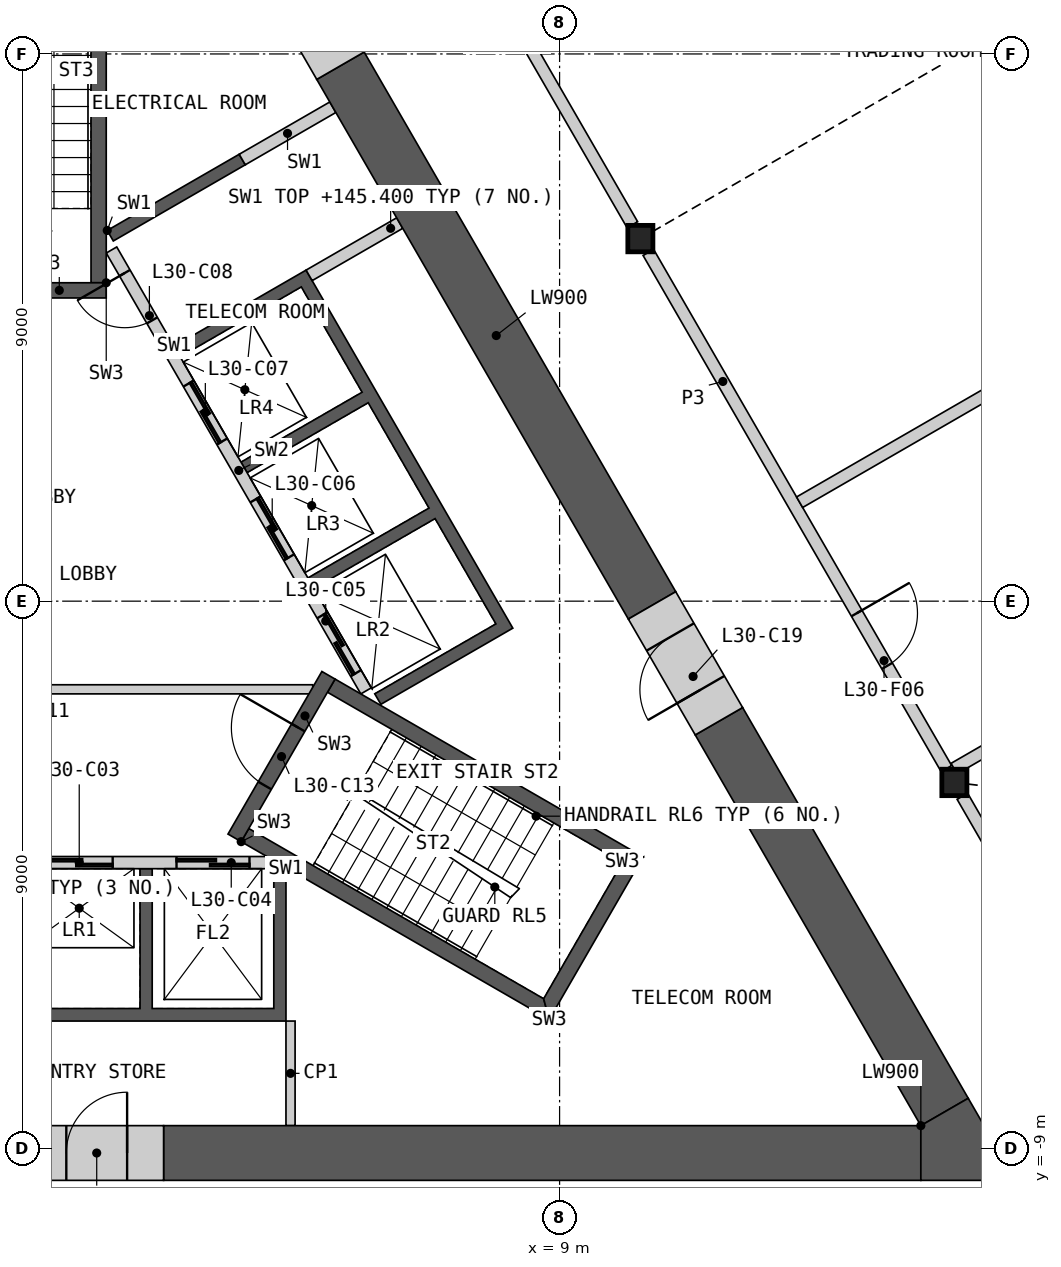
"""IFC4 building model, lengths in metres.
Left out: names, types, materials, properties, quantities, classifications, styles, units other than length and angle.
Written with IfcOpenShell. Run it as: python <this file> out.ifc"""

import sys

from ifc_helpers import new_model, si_unit, direction, frame, frame_2d, origin, origin_2d, place, context, subcontext, project, spatial, polyline, rectangle, i_section, outline, extrude, element, fill, save


model = new_model("IFC4")
c1 = context("Model", 3, precision=1e-05, world=origin(), true_north=direction((0.0, 1.0)))
c2 = subcontext(c1, "Body", "Model", "MODEL_VIEW")
j1 = project(units=[si_unit("LENGTHUNIT", "METRE"), si_unit("PLANEANGLEUNIT", "RADIAN")], contexts=[c1])
p1 = place(None, origin())
s1 = spatial("IfcSite", under=j1, at=p1, CompositionType="ELEMENT")
p2 = place(p1, origin())
s2 = spatial("IfcBuilding", under=s1, at=p2, CompositionType="ELEMENT")
p3 = place(p2, frame((0.0, 0.0, 141.6)))
s3 = spatial("IfcBuildingStorey", under=s2, at=p3, CompositionType="ELEMENT", Elevation=141.6)
for number, where, z_axis, x_axis in (
    (1, (15.493, -2.982, 0.0), (0.0, 0.0, 1.0), (1.0, 0.0, 0.0)),
    (2, (10.328, 5.963, 0.0), (0.0, 0.0, 1.0), (1.0, 0.0, 0.0)),
):
    element("IfcColumn", number, at=place(p3, frame(where, z_axis=z_axis, x_axis=x_axis)), inside=s3, PredefinedType="COLUMN", context=c2, shape_type="SweptSolid", body=[
        extrude(i_section(OverallWidth=0.412, OverallDepth=0.435, WebThickness=0.036, FlangeThickness=0.057, at=origin_2d()), origin(), (0.0, 0.0, 1.0), 4.2),
    ])
p4 = place(p3, origin())
e3 = element("IfcWall", 3, at=p4, inside=s3, PredefinedType="SHEAR", context=c2, shape_type="SweptSolid", body=[
    extrude(outline(polyline([(4.5, -4.4), (4.5, -6.906), (-4.5, -6.906), (-4.5, -4.4), (-4.3, -4.4), (-4.3, -6.7), (-2.3, -6.7), (-2.3, -4.4), (-2.1, -4.4), (-2.1, -6.7), (-0.1, -6.7), (-0.1, -4.4), (0.1, -4.4), (0.1, -6.7), (2.1, -6.7), (2.1, -4.4), (2.3, -4.4), (2.3, -6.7), (4.3, -6.7), (4.3, -4.4), (4.5, -4.4)])), origin(), (0.0, 0.0, 1.0), 3.8),
])
p5 = place(p3, frame((-4.187, -4.3, 0.0), z_axis=(0.0, 0.0, 1.0), x_axis=(1.0, 0.0, 0.0)))
e4 = element("IfcWall", 4, at=p5, inside=s3, PredefinedType="SOLIDWALL", context=c2, shape_type="SweptSolid", body=[
    extrude(rectangle(XDim=8.373, YDim=0.2, at=frame_2d((4.187, 0.0))), origin(), (0.0, 0.0, 1.0), 3.8),
])
p6 = place(p5, frame((0.287, 0.0, 0.0)))
e5 = element("IfcOpeningElement", 5, at=p6, cuts=e4, PredefinedType="OPENING", context=c2, shape_type="SweptSolid", body=[
    extrude(rectangle(XDim=1.2, YDim=2.1, at=frame_2d((0.6, 1.05))), frame((0.0, 0.11, 0.0), z_axis=(0.0, -1.0, 0.0), x_axis=(1.0, 0.0, 0.0)), (0.0, 0.0, 1.0), 0.22),
])
p7 = place(p5, frame((2.387, 0.0, 0.0)))
e6 = element("IfcOpeningElement", 6, at=p7, cuts=e4, PredefinedType="OPENING", context=c2, shape_type="SweptSolid", body=[
    extrude(rectangle(XDim=1.4, YDim=2.1, at=frame_2d((0.7, 1.05))), frame((0.0, 0.11, 0.0), z_axis=(0.0, -1.0, 0.0), x_axis=(1.0, 0.0, 0.0)), (0.0, 0.0, 1.0), 0.22),
])
p8 = place(p5, frame((4.737, 0.0, 0.0)))
e7 = element("IfcOpeningElement", 7, at=p8, cuts=e4, PredefinedType="OPENING", context=c2, shape_type="SweptSolid", body=[
    extrude(rectangle(XDim=1.1, YDim=2.1, at=frame_2d((0.55, 1.05))), frame((0.0, 0.11, 0.0), z_axis=(0.0, -1.0, 0.0), x_axis=(1.0, 0.0, 0.0)), (0.0, 0.0, 1.0), 0.22),
])
p9 = place(p5, frame((6.887, 0.0, 0.0)))
e8 = element("IfcOpeningElement", 8, at=p9, cuts=e4, PredefinedType="OPENING", context=c2, shape_type="SweptSolid", body=[
    extrude(rectangle(XDim=1.2, YDim=2.1, at=frame_2d((0.6, 1.05))), frame((0.0, 0.11, 0.0), z_axis=(0.0, -1.0, 0.0), x_axis=(1.0, 0.0, 0.0)), (0.0, 0.0, 1.0), 0.22),
])
p10 = place(p3, origin())
e9 = element("IfcWall", 9, at=p10, inside=s3, PredefinedType="SHEAR", context=c2, shape_type="SweptSolid", body=[
    extrude(outline(polyline([(1.561, 6.097), (3.731, 7.35), (3.831, 7.177), (1.66, 5.924), (1.561, 6.097)])), origin(), (0.0, 0.0, 1.0), 3.8),
])
p11 = place(p3, origin())
e10 = element("IfcWall", 10, at=p11, inside=s3, PredefinedType="SHEAR", context=c2, shape_type="SweptSolid", body=[
    extrude(outline(polyline([(2.66, 4.192), (4.831, 5.445), (8.231, -0.444), (6.061, -1.697), (5.96, -1.524), (7.952, -0.374), (6.952, 1.358), (4.96, 0.208), (4.861, 0.381), (6.852, 1.531), (5.852, 3.263), (3.861, 2.113), (3.76, 2.287), (5.752, 3.437), (4.752, 5.169), (2.76, 4.019), (2.66, 4.192)])), origin(), (0.0, 0.0, 1.0), 3.8),
])
p12 = place(p3, frame((5.817, -1.476, 0.0), z_axis=(0.0, 0.0, 1.0), x_axis=(-0.500002616675, 0.866023893041, 0.0)))
e11 = element("IfcWall", 11, at=p12, inside=s3, PredefinedType="SOLIDWALL", context=c2, shape_type="SweptSolid", body=[
    extrude(rectangle(XDim=8.373, YDim=0.2, at=frame_2d((4.187, 0.0))), origin(), (0.0, 0.0, 1.0), 3.8),
])
p13 = place(p12, frame((0.337, 0.0, 0.0)))
e12 = element("IfcOpeningElement", 12, at=p13, cuts=e11, PredefinedType="OPENING", context=c2, shape_type="SweptSolid", body=[
    extrude(rectangle(XDim=1.1, YDim=2.1, at=frame_2d((0.55, 1.05))), frame((0.0, 0.11, 0.0), z_axis=(0.0, -1.0, 0.0), x_axis=(1.0, 0.0, 0.0)), (0.0, 0.0, 1.0), 0.22),
])
p14 = place(p12, frame((2.537, 0.0, 0.0)))
e13 = element("IfcOpeningElement", 13, at=p14, cuts=e11, PredefinedType="OPENING", context=c2, shape_type="SweptSolid", body=[
    extrude(rectangle(XDim=1.1, YDim=2.1, at=frame_2d((0.55, 1.05))), frame((0.0, 0.11, 0.0), z_axis=(0.0, -1.0, 0.0), x_axis=(1.0, 0.0, 0.0)), (0.0, 0.0, 1.0), 0.22),
])
p15 = place(p12, frame((4.737, 0.0, 0.0)))
e14 = element("IfcOpeningElement", 14, at=p15, cuts=e11, PredefinedType="OPENING", context=c2, shape_type="SweptSolid", body=[
    extrude(rectangle(XDim=1.1, YDim=2.1, at=frame_2d((0.55, 1.05))), frame((0.0, 0.11, 0.0), z_axis=(0.0, -1.0, 0.0), x_axis=(1.0, 0.0, 0.0)), (0.0, 0.0, 1.0), 0.22),
])
p16 = place(p12, frame((7.037, 0.0, 0.0)))
e15 = element("IfcOpeningElement", 15, at=p16, cuts=e11, PredefinedType="OPENING", context=c2, shape_type="SweptSolid", body=[
    extrude(rectangle(XDim=0.9, YDim=2.1, at=frame_2d((0.45, 1.05))), frame((0.0, 0.11, 0.0), z_axis=(0.0, -1.0, 0.0), x_axis=(1.0, 0.0, 0.0)), (0.0, 0.0, 1.0), 0.22),
])
for number, where, z_axis, x_axis in (
    (16, (4.881, 5.358, 0.0), (0.0, 0.0, 1.0), (0.866, 0.5, 0.0)),
    (17, (3.781, 7.263, 0.0), (0.0, 0.0, 1.0), (0.866, 0.5, 0.0)),
):
    element("IfcWall", number, at=place(p3, frame(where, z_axis=z_axis, x_axis=x_axis)), inside=s3, PredefinedType="SHEAR", context=c2, shape_type="SweptSolid", body=[
        extrude(rectangle(XDim=1.72, YDim=0.2, at=frame_2d((0.86, 0.0))), origin(), (0.0, 0.0, 1.0), 3.8),
    ])
p17 = place(p3, frame((-4.941, -1.45, 0.0), z_axis=(0.0, 0.0, 1.0), x_axis=(1.0, 0.0, 0.0)))
e18 = element("IfcWall", 18, at=p17, inside=s3, PredefinedType="PARTITIONING", context=c2, shape_type="SweptSolid", body=[
    extrude(rectangle(XDim=9.882, YDim=0.15, at=frame_2d((4.941, 0.0))), origin(), (0.0, 0.0, 1.0), 3.8),
])
p18 = place(p17, frame((4.391, 0.0, 0.0)))
e19 = element("IfcOpeningElement", 19, at=p18, cuts=e18, PredefinedType="OPENING", context=c2, shape_type="SweptSolid", body=[
    extrude(rectangle(XDim=1.1, YDim=2.1, at=frame_2d((0.55, 1.05))), frame((0.0, 0.085, 0.0), z_axis=(0.0, -1.0, 0.0), x_axis=(1.0, 0.0, 0.0)), (0.0, 0.0, 1.0), 0.17),
])
p19 = place(p3, origin())
e20 = element("IfcWall", 20, at=p19, inside=s3, PredefinedType="SHEAR", context=c2, shape_type="SweptSolid", body=[
    extrude(outline(polyline([(3.763, -3.956), (8.83, -6.881), (8.738, -6.539), (3.888, -3.739), (3.763, -3.956)])), origin(), (0.0, 0.0, 1.0), 3.8),
])
p20 = place(p3, origin())
e21 = element("IfcWall", 21, at=p20, inside=s3, PredefinedType="SHEAR", context=c2, shape_type="SweptSolid", body=[
    extrude(outline(polyline([(8.83, -6.881), (10.374, -4.206), (10.032, -4.298), (8.738, -6.539), (8.83, -6.881)])), origin(), (0.0, 0.0, 1.0), 3.8),
])
p21 = place(p3, origin())
e22 = element("IfcWall", 22, at=p21, inside=s3, PredefinedType="SHEAR", context=c2, shape_type="SweptSolid", body=[
    extrude(outline(polyline([(10.032, -4.298), (10.374, -4.206), (5.307, -1.281), (5.182, -1.498), (10.032, -4.298)])), origin(), (0.0, 0.0, 1.0), 3.8),
])
p22 = place(p3, frame((3.655, -3.893, 0.0), z_axis=(0.0, 0.0, 1.0), x_axis=(0.499982516597, 0.866035497597, 0.0)))
e23 = element("IfcWall", 23, at=p22, inside=s3, PredefinedType="SHEAR", context=c2, shape_type="SweptSolid", body=[
    extrude(rectangle(XDim=3.088, YDim=0.25, at=frame_2d((1.544, 0.0))), origin(), (0.0, 0.0, 1.0), 3.8),
])
p23 = place(p22, frame((0.994, 0.0, 0.0)))
e24 = element("IfcOpeningElement", 24, at=p23, cuts=e23, PredefinedType="OPENING", context=c2, shape_type="SweptSolid", body=[
    extrude(rectangle(XDim=1.1, YDim=2.1, at=frame_2d((0.55, 1.05))), frame((0.0, 0.135, 0.0), z_axis=(0.0, -1.0, 0.0), x_axis=(1.0, 0.0, 0.0)), (0.0, 0.0, 1.0), 0.27),
])
p24 = place(p3, origin())
e25 = element("IfcWall", 25, at=p24, inside=s3, PredefinedType="SHEAR", context=c2, shape_type="SweptSolid", body=[
    extrude(outline(polyline([(1.544, 5.237), (1.544, 11.087), (1.294, 10.837), (1.294, 5.237), (1.544, 5.237)])), origin(), (0.0, 0.0, 1.0), 3.8),
])
p25 = place(p3, frame((1.544, 5.112, 0.0), z_axis=(0.0, 0.0, 1.0), x_axis=(-1.0, 0.0, 0.0)))
e26 = element("IfcWall", 26, at=p25, inside=s3, PredefinedType="SHEAR", context=c2, shape_type="SweptSolid", body=[
    extrude(rectangle(XDim=3.088, YDim=0.25, at=frame_2d((1.544, 0.0))), origin(), (0.0, 0.0, 1.0), 3.8),
])
p26 = place(p25, frame((0.994, 0.0, 0.0)))
e27 = element("IfcOpeningElement", 27, at=p26, cuts=e26, PredefinedType="OPENING", context=c2, shape_type="SweptSolid", body=[
    extrude(rectangle(XDim=1.1, YDim=2.1, at=frame_2d((0.55, 1.05))), frame((0.0, 0.135, 0.0), z_axis=(0.0, -1.0, 0.0), x_axis=(1.0, 0.0, 0.0)), (0.0, 0.0, 1.0), 0.27),
])
p27 = place(p3, frame((4.575, -6.906, 0.0), z_axis=(0.0, 0.0, 1.0), x_axis=(0.0, -1.0, 0.0)))
e28 = element("IfcWall", 28, at=p27, inside=s3, PredefinedType="PARTITIONING", context=c2, shape_type="SweptSolid", body=[
    extrude(rectangle(XDim=1.72, YDim=0.15, at=frame_2d((0.86, 0.0))), origin(), (0.0, 0.0, 1.0), 3.8),
])
p28 = place(p3, frame((2.488, -9.076, 0.0), z_axis=(0.0, 0.0, 1.0), x_axis=(1.0, 0.0, 0.0)))
e29 = element("IfcWall", 29, at=p28, inside=s3, PredefinedType="SHEAR", context=c2, shape_type="SweptSolid", body=[
    extrude(rectangle(XDim=12.454, YDim=0.9, at=frame_2d((6.227, 0.0))), origin(), (0.0, 0.0, 1.0), 3.8),
])
p29 = place(p3, frame((10.521, -0.07, 0.0), z_axis=(0.0, 0.0, 1.0), x_axis=(-0.499997384719, 0.866026913713, 0.0)))
e30 = element("IfcWall", 30, at=p29, inside=s3, PredefinedType="SHEAR", context=c2, shape_type="SweptSolid", body=[
    extrude(rectangle(XDim=10.249, YDim=0.9, at=frame_2d((5.125, 0.0))), origin(), (0.0, 0.0, 1.0), 3.8),
])
p30 = place(p3, frame((15.331, -8.401, 0.0), z_axis=(0.0, 0.0, 1.0), x_axis=(-0.499985413531, 0.866033825122, 0.0)))
e31 = element("IfcWall", 31, at=p30, inside=s3, PredefinedType="SHEAR", context=c2, shape_type="SweptSolid", body=[
    extrude(rectangle(XDim=7.421, YDim=0.9, at=frame_2d((3.71, 0.0))), origin(), (0.0, 0.0, 1.0), 3.8),
])
p31 = place(p3, origin())
e32 = element("IfcWall", 32, at=p31, inside=s3, PredefinedType="SHEAR", context=c2, shape_type="SweptSolid", body=[
    extrude(outline(polyline([(14.941, -8.626), (15.721, -8.176), (16.5, -9.526), (14.941, -9.526), (14.941, -8.626)])), origin(), (0.0, 0.0, 1.0), 3.8),
])
p32 = place(p3, frame((0.288, -9.076, 0.0), z_axis=(0.0, 0.0, 1.0), x_axis=(1.0, 0.0, 0.0)))
e33 = element("IfcWall", 33, at=p32, inside=s3, PredefinedType="SHEAR", context=c2, shape_type="SweptSolid", body=[
    extrude(rectangle(XDim=2.2, YDim=0.9, at=frame_2d((1.1, 0.0))), origin(), (0.0, 0.0, 1.0), 3.8),
])
p33 = place(p32, frame((0.6, 0.0, 0.0)))
e34 = element("IfcOpeningElement", 34, at=p33, cuts=e33, PredefinedType="OPENING", context=c2, shape_type="SweptSolid", body=[
    extrude(rectangle(XDim=1.0, YDim=2.1, at=frame_2d((0.5, 1.05))), frame((0.0, 0.46, 0.0), z_axis=(0.0, -1.0, 0.0), x_axis=(1.0, 0.0, 0.0)), (0.0, 0.0, 1.0), 0.92),
])
p34 = place(p3, frame((11.621, -1.975, 0.0), z_axis=(0.0, 0.0, 1.0), x_axis=(-0.50002983664, 0.866008176907, 0.0)))
e35 = element("IfcWall", 35, at=p34, inside=s3, PredefinedType="SHEAR", context=c2, shape_type="SweptSolid", body=[
    extrude(rectangle(XDim=2.2, YDim=0.9, at=frame_2d((1.1, 0.0))), origin(), (0.0, 0.0, 1.0), 3.8),
])
p35 = place(p34, frame((0.6, 0.0, 0.0)))
e36 = element("IfcOpeningElement", 36, at=p35, cuts=e35, PredefinedType="OPENING", context=c2, shape_type="SweptSolid", body=[
    extrude(rectangle(XDim=1.0, YDim=2.1, at=frame_2d((0.5, 1.05))), frame((0.0, 0.46, 0.0), z_axis=(0.0, -1.0, 0.0), x_axis=(1.0, 0.0, 0.0)), (0.0, 0.0, 1.0), 0.92),
])
p36 = place(p3, frame((5.396, 8.806, 0.0), z_axis=(0.0, 0.0, 1.0), x_axis=(-0.499981787252, 0.866035918664, 0.0)))
e37 = element("IfcWall", 37, at=p36, inside=s3, PredefinedType="SHEAR", context=c2, shape_type="SweptSolid", body=[
    extrude(rectangle(XDim=2.2, YDim=0.9, at=frame_2d((1.1, 0.0))), origin(), (0.0, 0.0, 1.0), 3.8),
])
p37 = place(p36, frame((0.6, 0.0, 0.0)))
e38 = element("IfcOpeningElement", 38, at=p37, cuts=e37, PredefinedType="OPENING", context=c2, shape_type="SweptSolid", body=[
    extrude(rectangle(XDim=1.0, YDim=2.1, at=frame_2d((0.5, 1.05))), frame((0.0, 0.46, 0.0), z_axis=(0.0, -1.0, 0.0), x_axis=(1.0, 0.0, 0.0)), (0.0, 0.0, 1.0), 0.92),
])
p38 = place(p3, frame((10.46, 5.736, 0.0), z_axis=(0.0, 0.0, 1.0), x_axis=(0.500004141693, -0.866023012564, 0.0)))
e39 = element("IfcWall", 39, at=p38, inside=s3, PredefinedType="PARTITIONING", context=c2, shape_type="SweptSolid", body=[
    extrude(rectangle(XDim=9.803, YDim=0.2, at=frame_2d((4.902, 0.0))), origin(), (0.0, 0.0, 1.0), 3.8),
])
p39 = place(p38, frame((6.853, 0.0, 0.0)))
e40 = element("IfcOpeningElement", 40, at=p39, cuts=e39, PredefinedType="OPENING", context=c2, shape_type="SweptSolid", body=[
    extrude(rectangle(XDim=1.0, YDim=2.1, at=frame_2d((0.5, 1.05))), frame((0.0, 0.11, 0.0), z_axis=(0.0, -1.0, 0.0), x_axis=(1.0, 0.0, 0.0)), (0.0, 0.0, 1.0), 0.22),
])
p40 = place(p3, frame((5.295, 14.68, 0.0), z_axis=(0.0, 0.0, 1.0), x_axis=(0.500012035596, -0.866018454918, 0.0)))
e41 = element("IfcWall", 41, at=p40, inside=s3, PredefinedType="PARTITIONING", context=c2, shape_type="SweptSolid", body=[
    extrude(rectangle(XDim=9.803, YDim=0.2, at=frame_2d((4.902, 0.0))), origin(), (0.0, 0.0, 1.0), 3.8),
])
p41 = place(p40, frame((4.052, 0.0, 0.0)))
e42 = element("IfcOpeningElement", 42, at=p41, cuts=e41, PredefinedType="OPENING", context=c2, shape_type="SweptSolid", body=[
    extrude(rectangle(XDim=1.8, YDim=2.1, at=frame_2d((0.9, 1.05))), frame((0.0, 0.11, 0.0), z_axis=(0.0, -1.0, 0.0), x_axis=(1.0, 0.0, 0.0)), (0.0, 0.0, 1.0), 0.22),
])
p42 = place(p3, frame((15.624, -3.209, 0.0), z_axis=(0.0, 0.0, 1.0), x_axis=(0.499997920671, -0.866026604282, 0.0)))
e43 = element("IfcWall", 43, at=p42, inside=s3, PredefinedType="PARTITIONING", context=c2, shape_type="SweptSolid", body=[
    extrude(rectangle(XDim=6.24, YDim=0.2, at=frame_2d((3.12, 0.0))), origin(), (0.0, 0.0, 1.0), 3.8),
])
p43 = place(p42, frame((2.57, 0.0, 0.0)))
e44 = element("IfcOpeningElement", 44, at=p43, cuts=e43, PredefinedType="OPENING", context=c2, shape_type="SweptSolid", body=[
    extrude(rectangle(XDim=1.0, YDim=2.1, at=frame_2d((0.5, 1.05))), frame((0.0, 0.11, 0.0), z_axis=(0.0, -1.0, 0.0), x_axis=(1.0, 0.0, 0.0)), (0.0, 0.0, 1.0), 0.22),
])
p44 = place(p3, frame((15.488, -2.754, 0.0), z_axis=(0.0, 0.0, 1.0), x_axis=(0.866026411352, 0.499998254837, 0.0)))
e45 = element("IfcWall", 45, at=p44, inside=s3, PredefinedType="PARTITIONING", context=c2, shape_type="SweptSolid", body=[
    extrude(rectangle(XDim=12.873, YDim=0.2, at=frame_2d((6.437, 0.0))), origin(), (0.0, 0.0, 1.0), 2.885),
])
p45 = place(p3, frame((12.947, 1.627, 0.0), z_axis=(0.0, 0.0, 1.0), x_axis=(0.866034669089, 0.499983951678, 0.0)))
e46 = element("IfcWall", 46, at=p45, inside=s3, PredefinedType="PARTITIONING", context=c2, shape_type="SweptSolid", body=[
    extrude(rectangle(XDim=8.27, YDim=0.2, at=frame_2d((4.135, 0.0))), origin(), (0.0, 0.0, 1.0), 2.885),
])
p46 = place(p8, origin())
e47 = element("IfcDoor", 47, at=p46, inside=s3, OperationType="SLIDING_TO_LEFT", PredefinedType="DOOR", context=c2, shape_type="SweptSolid", body=[
    extrude(rectangle(XDim=1.1, YDim=2.1, at=frame_2d((0.55, 1.05))), frame((0.0, 0.025, 0.0), z_axis=(0.0, -1.0, 0.0), x_axis=(1.0, 0.0, 0.0)), (0.0, 0.0, 1.0), 0.05),
])
fill(e7, e47)
p47 = place(p9, origin())
e48 = element("IfcDoor", 48, at=p47, inside=s3, OperationType="SLIDING_TO_LEFT", PredefinedType="DOOR", context=c2, shape_type="SweptSolid", body=[
    extrude(rectangle(XDim=1.2, YDim=2.1, at=frame_2d((0.6, 1.05))), frame((0.0, 0.025, 0.0), z_axis=(0.0, -1.0, 0.0), x_axis=(1.0, 0.0, 0.0)), (0.0, 0.0, 1.0), 0.05),
])
fill(e8, e48)
p48 = place(p13, origin())
e49 = element("IfcDoor", 49, at=p48, inside=s3, OperationType="SLIDING_TO_LEFT", PredefinedType="DOOR", context=c2, shape_type="SweptSolid", body=[
    extrude(rectangle(XDim=1.1, YDim=2.1, at=frame_2d((0.55, 1.05))), frame((0.0, 0.025, 0.0), z_axis=(0.0, -1.0, 0.0), x_axis=(1.0, 0.0, 0.0)), (0.0, 0.0, 1.0), 0.05),
])
fill(e12, e49)
p49 = place(p14, origin())
e50 = element("IfcDoor", 50, at=p49, inside=s3, OperationType="SLIDING_TO_LEFT", PredefinedType="DOOR", context=c2, shape_type="SweptSolid", body=[
    extrude(rectangle(XDim=1.1, YDim=2.1, at=frame_2d((0.55, 1.05))), frame((0.0, 0.025, 0.0), z_axis=(0.0, -1.0, 0.0), x_axis=(1.0, 0.0, 0.0)), (0.0, 0.0, 1.0), 0.05),
])
fill(e13, e50)
p50 = place(p15, origin())
e51 = element("IfcDoor", 51, at=p50, inside=s3, OperationType="SLIDING_TO_LEFT", PredefinedType="DOOR", context=c2, shape_type="SweptSolid", body=[
    extrude(rectangle(XDim=1.1, YDim=2.1, at=frame_2d((0.55, 1.05))), frame((0.0, 0.025, 0.0), z_axis=(0.0, -1.0, 0.0), x_axis=(1.0, 0.0, 0.0)), (0.0, 0.0, 1.0), 0.05),
])
fill(e14, e51)
p51 = place(p16, origin())
e52 = element("IfcDoor", 52, at=p51, inside=s3, OperationType="SINGLE_SWING_RIGHT", PredefinedType="DOOR", context=c2, shape_type="SweptSolid", body=[
    extrude(rectangle(XDim=0.9, YDim=2.1, at=frame_2d((0.45, 1.05))), frame((0.0, 0.025, 0.0), z_axis=(0.0, -1.0, 0.0), x_axis=(1.0, 0.0, 0.0)), (0.0, 0.0, 1.0), 0.05),
])
fill(e15, e52)
p52 = place(p23, origin())
e53 = element("IfcDoor", 53, at=p52, inside=s3, OperationType="SINGLE_SWING_RIGHT", PredefinedType="DOOR", context=c2, shape_type="SweptSolid", body=[
    extrude(rectangle(XDim=1.1, YDim=2.1, at=frame_2d((0.55, 1.05))), frame((0.0, 0.025, 0.0), z_axis=(0.0, -1.0, 0.0), x_axis=(1.0, 0.0, 0.0)), (0.0, 0.0, 1.0), 0.05),
])
fill(e24, e53)
p53 = place(p33, origin())
e54 = element("IfcDoor", 54, at=p53, inside=s3, OperationType="SINGLE_SWING_RIGHT", PredefinedType="DOOR", context=c2, shape_type="SweptSolid", body=[
    extrude(rectangle(XDim=1.0, YDim=2.1, at=frame_2d((0.5, 1.05))), frame((0.0, 0.205, 0.0), z_axis=(0.0, -1.0, 0.0), x_axis=(1.0, 0.0, 0.0)), (0.0, 0.0, 1.0), 0.05),
])
fill(e34, e54)
p54 = place(p35, origin())
e55 = element("IfcDoor", 55, at=p54, inside=s3, OperationType="SINGLE_SWING_LEFT", PredefinedType="DOOR", context=c2, shape_type="SweptSolid", body=[
    extrude(rectangle(XDim=1.0, YDim=2.1, at=frame_2d((0.5, 1.05))), frame((0.0, 0.205, 0.0), z_axis=(0.0, -1.0, 0.0), x_axis=(1.0, 0.0, 0.0)), (0.0, 0.0, 1.0), 0.05),
])
fill(e36, e55)
p55 = place(p39, origin())
e56 = element("IfcDoor", 56, at=p55, inside=s3, OperationType="SINGLE_SWING_LEFT", PredefinedType="DOOR", context=c2, shape_type="SweptSolid", body=[
    extrude(rectangle(XDim=1.0, YDim=2.1, at=frame_2d((0.5, 1.05))), frame((0.0, 0.025, 0.0), z_axis=(0.0, -1.0, 0.0), x_axis=(1.0, 0.0, 0.0)), (0.0, 0.0, 1.0), 0.05),
])
fill(e40, e56)
save(model, sys.argv[1])
